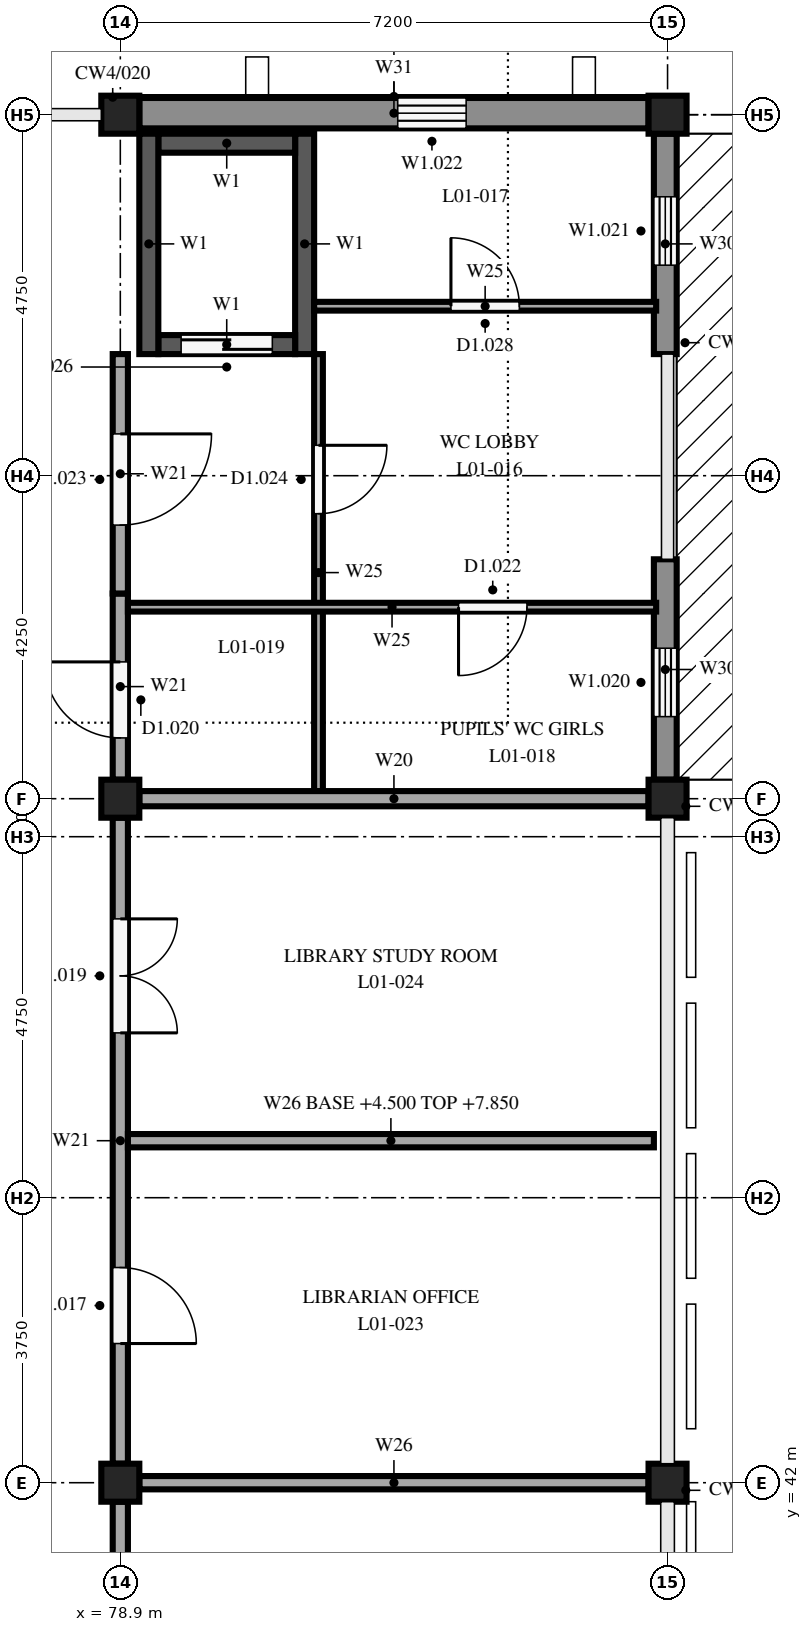
"""IFC4 building model, lengths in metres.
Left out: names, types, materials, properties, quantities, classifications, styles, units other than length and angle.
Written with IfcOpenShell. Run it as: python <this file> out.ifc"""

import sys

from ifc_helpers import new_model, si_unit, direction, frame, frame_2d, origin, origin_2d, place, context, subcontext, project, spatial, rectangle, extrude, element, fill, save


model = new_model("IFC4")
c1 = context("Model", 3, precision=1e-05, world=origin(), true_north=direction((0.0, 1.0)))
c2 = subcontext(c1, "Body", "Model", "MODEL_VIEW")
j1 = project(units=[si_unit("LENGTHUNIT", "METRE"), si_unit("PLANEANGLEUNIT", "RADIAN")], contexts=[c1])
p1 = place(None, origin())
s1 = spatial("IfcSite", under=j1, at=p1, CompositionType="ELEMENT")
p2 = place(p1, origin())
s2 = spatial("IfcBuilding", under=s1, at=p2, CompositionType="ELEMENT")
p3 = place(p2, frame((0.0, 0.0, 4.5)))
s3 = spatial("IfcBuildingStorey", under=s2, at=p3, CompositionType="ELEMENT", Elevation=4.5)
for number, where, z_axis, x_axis in (
    (1, (78.9, 42.0, 0.0), (0.0, 0.0, 1.0), (1.0, 0.0, 0.0)),
    (2, (78.9, 51.0, 0.0), (0.0, 0.0, 1.0), (1.0, 0.0, 0.0)),
    (3, (78.9, 60.0, 0.0), (0.0, 0.0, 1.0), (1.0, 0.0, 0.0)),
    (4, (86.1, 42.0, 0.0), (0.0, 0.0, 1.0), (1.0, 0.0, 0.0)),
    (5, (86.1, 51.0, 0.0), (0.0, 0.0, 1.0), (1.0, 0.0, 0.0)),
    (6, (86.1, 60.0, 0.0), (0.0, 0.0, 1.0), (1.0, 0.0, 0.0)),
):
    element("IfcColumn", number, at=place(p3, frame(where, z_axis=z_axis, x_axis=x_axis)), inside=s3, PredefinedType="COLUMN", context=c2, shape_type="SweptSolid", body=[
        extrude(rectangle(XDim=0.5, YDim=0.5, at=origin_2d()), origin(), (0.0, 0.0, 1.0), 3.35),
    ])
for number, where, z_axis, x_axis in (
    (7, (79.275, 56.85, 0.0), (0.0, 0.0, 1.0), (0.0, 1.0, 0.0)),
    (8, (81.325, 56.85, 0.0), (0.0, 0.0, 1.0), (0.0, 1.0, 0.0)),
):
    element("IfcWall", number, at=place(p3, frame(where, z_axis=z_axis, x_axis=x_axis)), inside=s3, PredefinedType="SHEAR", context=c2, shape_type="SweptSolid", body=[
        extrude(rectangle(XDim=2.9, YDim=0.25, at=frame_2d((1.45, 0.0))), origin(), (0.0, 0.0, 1.0), 3.35),
    ])
p4 = place(p3, frame((79.4, 56.975, 0.0), z_axis=(0.0, 0.0, 1.0), x_axis=(1.0, 0.0, 0.0)))
e9 = element("IfcWall", 9, at=p4, inside=s3, PredefinedType="SHEAR", context=c2, shape_type="SweptSolid", body=[
    extrude(rectangle(XDim=1.8, YDim=0.25, at=frame_2d((0.9, 0.0))), origin(), (0.0, 0.0, 1.0), 3.35),
])
p5 = place(p4, frame((0.3, 0.0, 0.0)))
e10 = element("IfcOpeningElement", 10, at=p5, cuts=e9, PredefinedType="OPENING", context=c2, shape_type="SweptSolid", body=[
    extrude(rectangle(XDim=1.2, YDim=2.1, at=frame_2d((0.6, 1.05))), frame((0.0, 0.135, 0.0), z_axis=(0.0, -1.0, 0.0), x_axis=(1.0, 0.0, 0.0)), (0.0, 0.0, 1.0), 0.27),
])
p6 = place(p3, frame((79.4, 59.625, 0.0), z_axis=(0.0, 0.0, 1.0), x_axis=(1.0, 0.0, 0.0)))
e11 = element("IfcWall", 11, at=p6, inside=s3, PredefinedType="SHEAR", context=c2, shape_type="SweptSolid", body=[
    extrude(rectangle(XDim=1.8, YDim=0.25, at=frame_2d((0.9, 0.0))), origin(), (0.0, 0.0, 1.0), 3.35),
])
p7 = place(p3, frame((86.07, 54.15, 0.0), z_axis=(0.0, 0.0, 1.0), x_axis=(0.0, -1.0, 0.0)))
e12 = element("IfcWall", 12, at=p7, inside=s3, PredefinedType="STANDARD", context=c2, shape_type="SweptSolid", body=[
    extrude(rectangle(XDim=2.9, YDim=0.3, at=frame_2d((1.45, 0.0))), origin(), (0.0, 0.0, 1.0), 2.85),
])
p8 = place(p7, frame((1.17, 0.0, 1.6)))
e13 = element("IfcOpeningElement", 13, at=p8, cuts=e12, PredefinedType="OPENING", context=c2, shape_type="SweptSolid", body=[
    extrude(rectangle(XDim=0.9, YDim=1.0, at=frame_2d((0.45, 0.5))), frame((0.0, 0.16, 0.0), z_axis=(0.0, -1.0, 0.0), x_axis=(1.0, 0.0, 0.0)), (0.0, 0.0, 1.0), 0.32),
])
p9 = place(p3, frame((86.07, 59.75, 0.0), z_axis=(0.0, 0.0, 1.0), x_axis=(0.0, -1.0, 0.0)))
e14 = element("IfcWall", 14, at=p9, inside=s3, PredefinedType="STANDARD", context=c2, shape_type="SweptSolid", body=[
    extrude(rectangle(XDim=2.9, YDim=0.3, at=frame_2d((1.45, 0.0))), origin(), (0.0, 0.0, 1.0), 2.85),
])
p10 = place(p9, frame((0.83, 0.0, 1.6)))
e15 = element("IfcOpeningElement", 15, at=p10, cuts=e14, PredefinedType="OPENING", context=c2, shape_type="SweptSolid", body=[
    extrude(rectangle(XDim=0.9, YDim=1.0, at=frame_2d((0.45, 0.5))), frame((0.0, 0.16, 0.0), z_axis=(0.0, -1.0, 0.0), x_axis=(1.0, 0.0, 0.0)), (0.0, 0.0, 1.0), 0.32),
])
p11 = place(p3, frame((79.15, 60.02, 0.0), z_axis=(0.0, 0.0, 1.0), x_axis=(1.0, 0.0, 0.0)))
e16 = element("IfcWall", 16, at=p11, inside=s3, PredefinedType="STANDARD", context=c2, shape_type="SweptSolid", body=[
    extrude(rectangle(XDim=6.7, YDim=0.4, at=frame_2d((3.35, 0.0))), origin(), (0.0, 0.0, 1.0), 2.9),
])
p12 = place(p11, frame((3.4, 0.0, 1.6)))
e17 = element("IfcOpeningElement", 17, at=p12, cuts=e16, PredefinedType="OPENING", context=c2, shape_type="SweptSolid", body=[
    extrude(rectangle(XDim=0.9, YDim=1.0, at=frame_2d((0.45, 0.5))), frame((0.0, 0.21, 0.0), z_axis=(0.0, -1.0, 0.0), x_axis=(1.0, 0.0, 0.0)), (0.0, 0.0, 1.0), 0.42),
])
p13 = place(p3, frame((78.9, 51.25, 0.0), z_axis=(0.0, 0.0, 1.0), x_axis=(0.0, 1.0, 0.0)))
e18 = element("IfcWall", 18, at=p13, inside=s3, PredefinedType="PARTITIONING", context=c2, shape_type="SweptSolid", body=[
    extrude(rectangle(XDim=2.45, YDim=0.2, at=frame_2d((1.225, 0.0))), origin(), (0.0, 0.0, 1.0), 2.9),
])
p14 = place(p13, frame((0.55, 0.0, 0.0)))
e19 = element("IfcOpeningElement", 19, at=p14, cuts=e18, PredefinedType="OPENING", context=c2, shape_type="SweptSolid", body=[
    extrude(rectangle(XDim=1.0, YDim=2.1, at=frame_2d((0.5, 1.05))), frame((0.0, 0.11, 0.0), z_axis=(0.0, -1.0, 0.0), x_axis=(1.0, 0.0, 0.0)), (0.0, 0.0, 1.0), 0.22),
])
p15 = place(p3, frame((78.9, 56.85, 0.0), z_axis=(0.0, 0.0, 1.0), x_axis=(0.0, -1.0, 0.0)))
e20 = element("IfcWall", 20, at=p15, inside=s3, PredefinedType="PARTITIONING", context=c2, shape_type="SweptSolid", body=[
    extrude(rectangle(XDim=3.15, YDim=0.2, at=frame_2d((1.575, 0.0))), origin(), (0.0, 0.0, 1.0), 2.9),
])
p16 = place(p15, frame((1.05, 0.0, 0.0)))
e21 = element("IfcOpeningElement", 21, at=p16, cuts=e20, PredefinedType="OPENING", context=c2, shape_type="SweptSolid", body=[
    extrude(rectangle(XDim=1.2, YDim=2.1, at=frame_2d((0.6, 1.05))), frame((0.0, 0.11, 0.0), z_axis=(0.0, -1.0, 0.0), x_axis=(1.0, 0.0, 0.0)), (0.0, 0.0, 1.0), 0.22),
])
p17 = place(p3, frame((79.15, 51.0, 0.0), z_axis=(0.0, 0.0, 1.0), x_axis=(1.0, 0.0, 0.0)))
e22 = element("IfcWall", 22, at=p17, inside=s3, PredefinedType="PARTITIONING", context=c2, shape_type="SweptSolid", body=[
    extrude(rectangle(XDim=6.7, YDim=0.2, at=frame_2d((3.35, 0.0))), origin(), (0.0, 0.0, 1.0), 2.9),
])
p18 = place(p3, frame((81.508, 56.85, 0.0), z_axis=(0.0, 0.0, 1.0), x_axis=(0.0, -1.0, 0.0)))
e23 = element("IfcWall", 23, at=p18, inside=s3, PredefinedType="PARTITIONING", context=c2, shape_type="SweptSolid", body=[
    extrude(rectangle(XDim=5.75, YDim=0.115, at=frame_2d((2.875, 0.0))), origin(), (0.0, 0.0, 1.0), 3.35),
])
p19 = place(p18, frame((1.2, 0.0, 0.0)))
e24 = element("IfcOpeningElement", 24, at=p19, cuts=e23, PredefinedType="OPENING", context=c2, shape_type="SweptSolid", body=[
    extrude(rectangle(XDim=0.9, YDim=2.1, at=frame_2d((0.45, 1.05))), frame((0.0, 0.067, 0.0), z_axis=(0.0, -1.0, 0.0), x_axis=(1.0, 0.0, 0.0)), (0.0, 0.0, 1.0), 0.135),
])
p20 = place(p3, frame((81.45, 57.48, 0.0), z_axis=(0.0, 0.0, 1.0), x_axis=(1.0, 0.0, 0.0)))
e25 = element("IfcWall", 25, at=p20, inside=s3, PredefinedType="PARTITIONING", context=c2, shape_type="SweptSolid", body=[
    extrude(rectangle(XDim=4.5, YDim=0.115, at=frame_2d((2.25, 0.0))), origin(), (0.0, 0.0, 1.0), 3.35),
])
p21 = place(p20, frame((1.8, 0.0, 0.0)))
e26 = element("IfcOpeningElement", 26, at=p21, cuts=e25, PredefinedType="OPENING", context=c2, shape_type="SweptSolid", body=[
    extrude(rectangle(XDim=0.9, YDim=2.1, at=frame_2d((0.45, 1.05))), frame((0.0, 0.067, 0.0), z_axis=(0.0, -1.0, 0.0), x_axis=(1.0, 0.0, 0.0)), (0.0, 0.0, 1.0), 0.135),
])
p22 = place(p3, frame((85.95, 53.52, 0.0), z_axis=(0.0, 0.0, 1.0), x_axis=(-1.0, 0.0, 0.0)))
e27 = element("IfcWall", 27, at=p22, inside=s3, PredefinedType="PARTITIONING", context=c2, shape_type="SweptSolid", body=[
    extrude(rectangle(XDim=6.95, YDim=0.115, at=frame_2d((3.475, 0.0))), origin(), (0.0, 0.0, 1.0), 3.35),
])
p23 = place(p22, frame((1.7, 0.0, 0.0)))
e28 = element("IfcOpeningElement", 28, at=p23, cuts=e27, PredefinedType="OPENING", context=c2, shape_type="SweptSolid", body=[
    extrude(rectangle(XDim=0.9, YDim=2.1, at=frame_2d((0.45, 1.05))), frame((0.0, 0.067, 0.0), z_axis=(0.0, -1.0, 0.0), x_axis=(1.0, 0.0, 0.0)), (0.0, 0.0, 1.0), 0.135),
])
p24 = place(p3, frame((78.9, 41.75, 0.0), z_axis=(0.0, 0.0, 1.0), x_axis=(0.0, -1.0, 0.0)))
e29 = element("IfcWall", 29, at=p24, inside=s3, PredefinedType="PARTITIONING", context=c2, shape_type="SweptSolid", body=[
    extrude(rectangle(XDim=8.5, YDim=0.2, at=frame_2d((4.25, 0.0))), origin(), (0.0, 0.0, 1.0), 2.9),
])
p25 = place(p24, frame((1.581, 0.0, 0.0)))
e30 = element("IfcOpeningElement", 30, at=p25, cuts=e29, PredefinedType="OPENING", context=c2, shape_type="SweptSolid", body=[
    extrude(rectangle(XDim=1.0, YDim=2.1, at=frame_2d((0.5, 1.05))), frame((0.0, 0.11, 0.0), z_axis=(0.0, -1.0, 0.0), x_axis=(1.0, 0.0, 0.0)), (0.0, 0.0, 1.0), 0.22),
])
p26 = place(p3, frame((78.9, 50.75, 0.0), z_axis=(0.0, 0.0, 1.0), x_axis=(0.0, -1.0, 0.0)))
e31 = element("IfcWall", 31, at=p26, inside=s3, PredefinedType="PARTITIONING", context=c2, shape_type="SweptSolid", body=[
    extrude(rectangle(XDim=8.5, YDim=0.2, at=frame_2d((4.25, 0.0))), origin(), (0.0, 0.0, 1.0), 2.9),
])
p27 = place(p26, frame((5.919, 0.0, 0.0)))
e32 = element("IfcOpeningElement", 32, at=p27, cuts=e31, PredefinedType="OPENING", context=c2, shape_type="SweptSolid", body=[
    extrude(rectangle(XDim=1.0, YDim=2.1, at=frame_2d((0.5, 1.05))), frame((0.0, 0.11, 0.0), z_axis=(0.0, -1.0, 0.0), x_axis=(1.0, 0.0, 0.0)), (0.0, 0.0, 1.0), 0.22),
])
p28 = place(p26, frame((1.331, 0.0, 0.0)))
e33 = element("IfcOpeningElement", 33, at=p28, cuts=e31, PredefinedType="OPENING", context=c2, shape_type="SweptSolid", body=[
    extrude(rectangle(XDim=1.5, YDim=2.1, at=frame_2d((0.75, 1.05))), frame((0.0, 0.11, 0.0), z_axis=(0.0, -1.0, 0.0), x_axis=(1.0, 0.0, 0.0)), (0.0, 0.0, 1.0), 0.22),
])
p29 = place(p3, frame((79.15, 42.0, 0.0), z_axis=(0.0, 0.0, 1.0), x_axis=(1.0, 0.0, 0.0)))
e34 = element("IfcWall", 34, at=p29, inside=s3, PredefinedType="PARTITIONING", context=c2, shape_type="SweptSolid", body=[
    extrude(rectangle(XDim=6.7, YDim=0.175, at=frame_2d((3.35, 0.0))), origin(), (0.0, 0.0, 1.0), 2.9),
])
p30 = place(p3, frame((79.0, 46.5, 0.0), z_axis=(0.0, 0.0, 1.0), x_axis=(1.0, 0.0, 0.0)))
e35 = element("IfcWall", 35, at=p30, inside=s3, PredefinedType="PARTITIONING", context=c2, shape_type="SweptSolid", body=[
    extrude(rectangle(XDim=6.92, YDim=0.175, at=frame_2d((3.46, 0.0))), origin(), (0.0, 0.0, 1.0), 3.35),
])
p31 = place(p8, origin())
e36 = element("IfcWindow", 36, at=p31, inside=s3, PartitioningType="SINGLE_PANEL", PredefinedType="WINDOW", context=c2, shape_type="SweptSolid", body=[
    extrude(rectangle(XDim=0.9, YDim=1.0, at=frame_2d((0.45, 0.5))), frame((0.0, 0.03, 0.0), z_axis=(0.0, -1.0, 0.0), x_axis=(1.0, 0.0, 0.0)), (0.0, 0.0, 1.0), 0.06),
])
fill(e13, e36)
p32 = place(p10, origin())
e37 = element("IfcWindow", 37, at=p32, inside=s3, PartitioningType="SINGLE_PANEL", PredefinedType="WINDOW", context=c2, shape_type="SweptSolid", body=[
    extrude(rectangle(XDim=0.9, YDim=1.0, at=frame_2d((0.45, 0.5))), frame((0.0, 0.03, 0.0), z_axis=(0.0, -1.0, 0.0), x_axis=(1.0, 0.0, 0.0)), (0.0, 0.0, 1.0), 0.06),
])
fill(e15, e37)
p33 = place(p12, origin())
e38 = element("IfcWindow", 38, at=p33, inside=s3, PartitioningType="SINGLE_PANEL", PredefinedType="WINDOW", context=c2, shape_type="SweptSolid", body=[
    extrude(rectangle(XDim=0.9, YDim=1.0, at=frame_2d((0.45, 0.5))), frame((0.0, 0.03, 0.0), z_axis=(0.0, -1.0, 0.0), x_axis=(1.0, 0.0, 0.0)), (0.0, 0.0, 1.0), 0.06),
])
fill(e17, e38)
p34 = place(p14, origin())
e39 = element("IfcDoor", 39, at=p34, inside=s3, OperationType="SINGLE_SWING_RIGHT", PredefinedType="DOOR", context=c2, shape_type="SweptSolid", body=[
    extrude(rectangle(XDim=1.0, YDim=2.1, at=frame_2d((0.5, 1.05))), frame((0.0, 0.025, 0.0), z_axis=(0.0, -1.0, 0.0), x_axis=(1.0, 0.0, 0.0)), (0.0, 0.0, 1.0), 0.05),
])
fill(e19, e39)
p35 = place(p16, origin())
e40 = element("IfcDoor", 40, at=p35, inside=s3, OperationType="SINGLE_SWING_LEFT", PredefinedType="DOOR", context=c2, shape_type="SweptSolid", body=[
    extrude(rectangle(XDim=1.2, YDim=2.1, at=frame_2d((0.6, 1.05))), frame((0.0, 0.025, 0.0), z_axis=(0.0, -1.0, 0.0), x_axis=(1.0, 0.0, 0.0)), (0.0, 0.0, 1.0), 0.05),
])
fill(e21, e40)
p36 = place(p19, origin())
e41 = element("IfcDoor", 41, at=p36, inside=s3, OperationType="SINGLE_SWING_LEFT", PredefinedType="DOOR", context=c2, shape_type="SweptSolid", body=[
    extrude(rectangle(XDim=0.9, YDim=2.1, at=frame_2d((0.45, 1.05))), frame((0.0, 0.025, 0.0), z_axis=(0.0, -1.0, 0.0), x_axis=(1.0, 0.0, 0.0)), (0.0, 0.0, 1.0), 0.05),
])
fill(e24, e41)
p37 = place(p21, origin())
e42 = element("IfcDoor", 42, at=p37, inside=s3, OperationType="SINGLE_SWING_LEFT", PredefinedType="DOOR", context=c2, shape_type="SweptSolid", body=[
    extrude(rectangle(XDim=0.9, YDim=2.1, at=frame_2d((0.45, 1.05))), frame((0.0, 0.025, 0.0), z_axis=(0.0, -1.0, 0.0), x_axis=(1.0, 0.0, 0.0)), (0.0, 0.0, 1.0), 0.05),
])
fill(e26, e42)
p38 = place(p23, origin())
e43 = element("IfcDoor", 43, at=p38, inside=s3, OperationType="SINGLE_SWING_RIGHT", PredefinedType="DOOR", context=c2, shape_type="SweptSolid", body=[
    extrude(rectangle(XDim=0.9, YDim=2.1, at=frame_2d((0.45, 1.05))), frame((0.0, 0.025, 0.0), z_axis=(0.0, -1.0, 0.0), x_axis=(1.0, 0.0, 0.0)), (0.0, 0.0, 1.0), 0.05),
])
fill(e28, e43)
p39 = place(p27, origin())
e44 = element("IfcDoor", 44, at=p39, inside=s3, OperationType="SINGLE_SWING_RIGHT", PredefinedType="DOOR", context=c2, shape_type="SweptSolid", body=[
    extrude(rectangle(XDim=1.0, YDim=2.1, at=frame_2d((0.5, 1.05))), frame((0.0, 0.025, 0.0), z_axis=(0.0, -1.0, 0.0), x_axis=(1.0, 0.0, 0.0)), (0.0, 0.0, 1.0), 0.05),
])
fill(e32, e44)
p40 = place(p28, origin())
e45 = element("IfcDoor", 45, at=p40, inside=s3, OperationType="DOUBLE_DOOR_SINGLE_SWING", PredefinedType="DOOR", context=c2, shape_type="SweptSolid", body=[
    extrude(rectangle(XDim=1.5, YDim=2.1, at=frame_2d((0.75, 1.05))), frame((0.0, 0.025, 0.0), z_axis=(0.0, -1.0, 0.0), x_axis=(1.0, 0.0, 0.0)), (0.0, 0.0, 1.0), 0.05),
])
fill(e33, e45)
p41 = place(p5, origin())
e46 = element("IfcDoor", 46, at=p41, inside=s3, OperationType="SLIDING_TO_LEFT", PredefinedType="DOOR", context=c2, shape_type="SweptSolid", body=[
    extrude(rectangle(XDim=1.2, YDim=2.1, at=frame_2d((0.6, 1.05))), frame((0.0, 0.025, 0.0), z_axis=(0.0, -1.0, 0.0), x_axis=(1.0, 0.0, 0.0)), (0.0, 0.0, 1.0), 0.05),
])
fill(e10, e46)
save(model, sys.argv[1])
